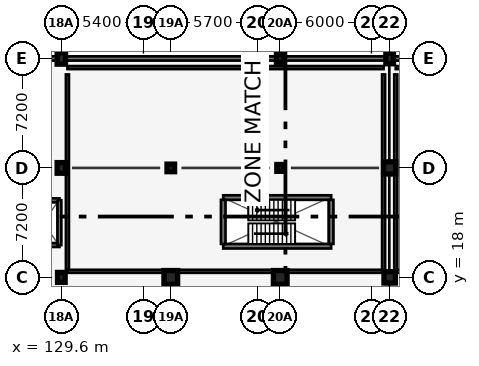
"""IFC4 building model, lengths in metres.
Left out: names, types, materials, properties, quantities, classifications, styles, units other than length and angle.
Written with IfcOpenShell. Run it as: python <this file> out.ifc"""

import sys

from ifc_helpers import new_model, si_unit, direction, frame, frame_2d, origin, origin_2d, place, context, subcontext, project, spatial, rectangle, circle, extrude, element, fill, save


model = new_model("IFC4")
c1 = context("Model", 3, precision=1e-05, world=origin(), true_north=direction((0.0, 1.0)))
c2 = subcontext(c1, "Body", "Model", "MODEL_VIEW")
j1 = project(units=[si_unit("LENGTHUNIT", "METRE"), si_unit("PLANEANGLEUNIT", "RADIAN")], contexts=[c1])
p1 = place(None, origin())
s1 = spatial("IfcSite", under=j1, at=p1, CompositionType="ELEMENT")
p2 = place(p1, origin())
s2 = spatial("IfcBuilding", under=s1, at=p2, CompositionType="ELEMENT")
p3 = place(p2, frame((0.0, 0.0, 9.0)))
s3 = spatial("IfcBuildingStorey", under=s2, at=p3, CompositionType="ELEMENT", Elevation=9.0)
p4 = place(p3, frame((129.6, 18.0, 0.0), z_axis=(0.0, 0.0, 1.0), x_axis=(1.0, 0.0, 0.0)))
e1 = element("IfcColumn", 1, at=p4, inside=s3, PredefinedType="COLUMN", context=c2, shape_type="SweptSolid", body=[
    extrude(rectangle(XDim=0.5, YDim=0.65, at=origin_2d()), origin(), (0.0, 0.0, 1.0), 4.2),
])
p5 = place(p3, frame((129.6, 25.2, 0.0), z_axis=(0.0, 0.0, 1.0), x_axis=(1.0, 0.0, 0.0)))
e2 = element("IfcColumn", 2, at=p5, inside=s3, PredefinedType="COLUMN", context=c2, shape_type="SweptSolid", body=[
    extrude(rectangle(XDim=0.55, YDim=0.7, at=origin_2d()), origin(), (0.0, 0.0, 1.0), 4.2),
])
p6 = place(p3, frame((129.6, 32.4, 0.0), z_axis=(0.0, 0.0, 1.0), x_axis=(1.0, 0.0, 0.0)))
e3 = element("IfcColumn", 3, at=p6, inside=s3, PredefinedType="COLUMN", context=c2, shape_type="SweptSolid", body=[
    extrude(rectangle(XDim=0.55, YDim=0.75, at=origin_2d()), origin(), (0.0, 0.0, 1.0), 4.2),
])
p7 = place(p3, frame((136.8, 18.0, 0.0), z_axis=(0.0, 0.0, 1.0), x_axis=(1.0, 0.0, 0.0)))
e4 = element("IfcColumn", 4, at=p7, inside=s3, PredefinedType="COLUMN", context=c2, shape_type="SweptSolid", body=[
    extrude(rectangle(XDim=0.9, YDim=0.9, at=origin_2d()), origin(), (0.0, 0.0, 1.0), 4.2),
])
p8 = place(p3, frame((136.8, 25.2, 0.0), z_axis=(0.0, 0.0, 1.0), x_axis=(1.0, 0.0, 0.0)))
e5 = element("IfcColumn", 5, at=p8, inside=s3, PredefinedType="COLUMN", context=c2, shape_type="SweptSolid", body=[
    extrude(circle(Radius=0.25, at=origin_2d()), origin(), (0.0, 0.0, 1.0), 4.2),
])
p9 = place(p3, frame((144.0, 18.0, 0.0), z_axis=(0.0, 0.0, 1.0), x_axis=(1.0, 0.0, 0.0)))
e6 = element("IfcColumn", 6, at=p9, inside=s3, PredefinedType="COLUMN", context=c2, shape_type="SweptSolid", body=[
    extrude(circle(Radius=0.45, at=origin_2d()), origin(), (0.0, 0.0, 1.0), 4.2),
])
p10 = place(p3, frame((144.0, 25.2, 0.0), z_axis=(0.0, 0.0, 1.0), x_axis=(1.0, 0.0, 0.0)))
e7 = element("IfcColumn", 7, at=p10, inside=s3, PredefinedType="COLUMN", context=c2, shape_type="SweptSolid", body=[
    extrude(rectangle(XDim=0.45, YDim=0.45, at=origin_2d()), origin(), (0.0, 0.0, 1.0), 4.2),
])
p11 = place(p3, frame((144.0, 32.4, 0.0), z_axis=(0.0, 0.0, 1.0), x_axis=(1.0, 0.0, 0.0)))
e8 = element("IfcColumn", 8, at=p11, inside=s3, PredefinedType="COLUMN", context=c2, shape_type="SweptSolid", body=[
    extrude(rectangle(XDim=0.5, YDim=0.5, at=origin_2d()), origin(), (0.0, 0.0, 1.0), 4.2),
])
p12 = place(p3, frame((151.2, 18.0, 0.0), z_axis=(0.0, 0.0, 1.0), x_axis=(1.0, 0.0, 0.0)))
e9 = element("IfcColumn", 9, at=p12, inside=s3, PredefinedType="COLUMN", context=c2, shape_type="SweptSolid", body=[
    extrude(rectangle(XDim=0.75, YDim=0.75, at=origin_2d()), origin(), (0.0, 0.0, 1.0), 4.2),
])
p13 = place(p3, frame((151.2, 25.2, 0.0), z_axis=(0.0, 0.0, 1.0), x_axis=(1.0, 0.0, 0.0)))
e10 = element("IfcColumn", 10, at=p13, inside=s3, PredefinedType="COLUMN", context=c2, shape_type="SweptSolid", body=[
    extrude(rectangle(XDim=0.8, YDim=0.8, at=origin_2d()), origin(), (0.0, 0.0, 1.0), 4.2),
])
p14 = place(p3, frame((151.2, 32.4, 0.0), z_axis=(0.0, 0.0, 1.0), x_axis=(1.0, 0.0, 0.0)))
e11 = element("IfcColumn", 11, at=p14, inside=s3, PredefinedType="COLUMN", context=c2, shape_type="SweptSolid", body=[
    extrude(rectangle(XDim=0.5, YDim=0.7, at=origin_2d()), origin(), (0.0, 0.0, 1.0), 4.2),
])
p15 = place(p3, frame((165.6, 32.4, 0.0), z_axis=(0.0, 0.0, 1.0), x_axis=(-1.0, 0.0, 0.0)))
e12 = element("IfcWall", 12, at=p15, inside=s3, PredefinedType="SOLIDWALL", context=c2, shape_type="SweptSolid", body=[
    extrude(rectangle(XDim=43.2, YDim=0.28, at=frame_2d((21.6, 0.0))), origin(), (0.0, 0.0, 1.0), 3.4),
])
p16 = place(p15, frame((2.2, 0.0, 0.78)))
e13 = element("IfcOpeningElement", 13, at=p16, cuts=e12, PredefinedType="OPENING", context=c2, shape_type="SweptSolid", body=[
    extrude(rectangle(XDim=2.1, YDim=1.8, at=frame_2d((1.05, 0.9))), frame((0.0, 0.15, 0.0), z_axis=(0.0, -1.0, 0.0), x_axis=(1.0, 0.0, 0.0)), (0.0, 0.0, 1.0), 0.3),
])
p17 = place(p15, frame((9.4, 0.0, 0.78)))
e14 = element("IfcOpeningElement", 14, at=p17, cuts=e12, PredefinedType="OPENING", context=c2, shape_type="SweptSolid", body=[
    extrude(rectangle(XDim=1.1, YDim=1.65, at=frame_2d((0.55, 0.825))), frame((0.0, 0.15, 0.0), z_axis=(0.0, -1.0, 0.0), x_axis=(1.0, 0.0, 0.0)), (0.0, 0.0, 1.0), 0.3),
])
p18 = place(p15, frame((16.6, 0.0, 0.78)))
e15 = element("IfcOpeningElement", 15, at=p18, cuts=e12, PredefinedType="OPENING", context=c2, shape_type="SweptSolid", body=[
    extrude(rectangle(XDim=1.25, YDim=1.7, at=frame_2d((0.625, 0.85))), frame((0.0, 0.15, 0.0), z_axis=(0.0, -1.0, 0.0), x_axis=(1.0, 0.0, 0.0)), (0.0, 0.0, 1.0), 0.3),
])
p19 = place(p15, frame((23.8, 0.0, 0.78)))
e16 = element("IfcOpeningElement", 16, at=p19, cuts=e12, PredefinedType="OPENING", context=c2, shape_type="SweptSolid", body=[
    extrude(rectangle(XDim=1.35, YDim=1.75, at=frame_2d((0.675, 0.875))), frame((0.0, 0.15, 0.0), z_axis=(0.0, -1.0, 0.0), x_axis=(1.0, 0.0, 0.0)), (0.0, 0.0, 1.0), 0.3),
])
p20 = place(p15, frame((31.0, 0.0, 0.78)))
e17 = element("IfcOpeningElement", 17, at=p20, cuts=e12, PredefinedType="OPENING", context=c2, shape_type="SweptSolid", body=[
    extrude(rectangle(XDim=1.5, YDim=1.75, at=frame_2d((0.75, 0.875))), frame((0.0, 0.15, 0.0), z_axis=(0.0, -1.0, 0.0), x_axis=(1.0, 0.0, 0.0)), (0.0, 0.0, 1.0), 0.3),
])
p21 = place(p3, frame((140.25, 20.05, 0.0), z_axis=(0.0, 0.0, 1.0), x_axis=(1.0, 0.0, 0.0)))
e18 = element("IfcWall", 18, at=p21, inside=s3, PredefinedType="SHEAR", context=c2, shape_type="SweptSolid", body=[
    extrude(rectangle(XDim=7.1, YDim=0.3, at=frame_2d((3.55, 0.0))), origin(), (0.0, 0.0, 1.0), 3.875),
])
p22 = place(p21, frame((0.35, 0.0, 0.0)))
e19 = element("IfcOpeningElement", 19, at=p22, cuts=e18, PredefinedType="OPENING", context=c2, shape_type="SweptSolid", body=[
    extrude(rectangle(XDim=1.05, YDim=2.15, at=frame_2d((0.525, 1.075))), frame((0.0, 0.16, 0.0), z_axis=(0.0, -1.0, 0.0), x_axis=(1.0, 0.0, 0.0)), (0.0, 0.0, 1.0), 0.32),
])
p23 = place(p3, frame((147.35, 23.25, 0.0), z_axis=(0.0, 0.0, 1.0), x_axis=(-1.0, 0.0, 0.0)))
e20 = element("IfcWall", 20, at=p23, inside=s3, PredefinedType="SHEAR", context=c2, shape_type="SweptSolid", body=[
    extrude(rectangle(XDim=7.1, YDim=0.3, at=frame_2d((3.55, 0.0))), origin(), (0.0, 0.0, 1.0), 3.875),
])
for number, where, z_axis, x_axis in (
    (21, (147.35, 20.2, 0.0), (0.0, 0.0, 1.0), (0.0, 1.0, 0.0)),
    (22, (140.25, 23.1, 0.0), (0.0, 0.0, 1.0), (0.0, -1.0, 0.0)),
):
    element("IfcWall", number, at=place(p3, frame(where, z_axis=z_axis, x_axis=x_axis)), inside=s3, PredefinedType="SHEAR", context=c2, shape_type="SweptSolid", body=[
        extrude(rectangle(XDim=2.9, YDim=0.3, at=frame_2d((1.45, 0.0))), origin(), (0.0, 0.0, 1.0), 3.875),
    ])
p24 = place(p3, frame((127.325, 20.125, 0.0), z_axis=(0.0, 0.0, 1.0), x_axis=(1.0, 0.0, 0.0)))
e23 = element("IfcWall", 23, at=p24, inside=s3, PredefinedType="SHEAR", context=c2, shape_type="SweptSolid", body=[
    extrude(rectangle(XDim=2.15, YDim=0.25, at=frame_2d((1.075, 0.0))), origin(), (0.0, 0.0, 1.0), 3.9),
])
p25 = place(p3, frame((129.475, 23.075, 0.0), z_axis=(0.0, 0.0, 1.0), x_axis=(-1.0, 0.0, 0.0)))
e24 = element("IfcWall", 24, at=p25, inside=s3, PredefinedType="SHEAR", context=c2, shape_type="SweptSolid", body=[
    extrude(rectangle(XDim=2.15, YDim=0.25, at=frame_2d((1.075, 0.0))), origin(), (0.0, 0.0, 1.0), 3.9),
])
p26 = place(p25, frame((0.525, 0.0, 0.0)))
e25 = element("IfcOpeningElement", 25, at=p26, cuts=e24, PredefinedType="OPENING", context=c2, shape_type="SweptSolid", body=[
    extrude(rectangle(XDim=1.1, YDim=2.15, at=frame_2d((0.55, 1.075))), frame((0.0, 0.135, 0.0), z_axis=(0.0, -1.0, 0.0), x_axis=(1.0, 0.0, 0.0)), (0.0, 0.0, 1.0), 0.27),
])
p27 = place(p3, frame((129.475, 20.125, 0.0), z_axis=(0.0, 0.0, 1.0), x_axis=(0.0, 1.0, 0.0)))
e26 = element("IfcWall", 26, at=p27, inside=s3, PredefinedType="SHEAR", context=c2, shape_type="SweptSolid", body=[
    extrude(rectangle(XDim=2.95, YDim=0.25, at=frame_2d((1.475, 0.0))), origin(), (0.0, 0.0, 1.0), 3.9),
])
p28 = place(p3, frame((130.0, 31.8, 0.0), z_axis=(0.0, 0.0, 1.0), x_axis=(1.0, 0.0, 0.0)))
e27 = element("IfcWall", 27, at=p28, inside=s3, PredefinedType="SOLIDWALL", context=c2, shape_type="SweptSolid", body=[
    extrude(rectangle(XDim=20.8, YDim=0.2, at=frame_2d((10.4, 0.0))), origin(), (0.0, 0.0, 1.0), 3.502),
])
p29 = place(p3, frame((150.8, 18.4, 0.0), z_axis=(0.0, 0.0, 1.0), x_axis=(0.0, 1.0, 0.0)))
e28 = element("IfcWall", 28, at=p29, inside=s3, PredefinedType="SOLIDWALL", context=c2, shape_type="SweptSolid", body=[
    extrude(rectangle(XDim=12.95, YDim=0.2, at=frame_2d((6.475, 0.0))), origin(), (0.0, 0.0, 1.0), 3.207),
])
p30 = place(p3, frame((130.0, 31.35, 0.0), z_axis=(0.0, 0.0, 1.0), x_axis=(0.0, -1.0, 0.0)))
e29 = element("IfcWall", 29, at=p30, inside=s3, PredefinedType="SOLIDWALL", context=c2, shape_type="SweptSolid", body=[
    extrude(rectangle(XDim=12.95, YDim=0.2, at=frame_2d((6.475, 0.0))), origin(), (0.0, 0.0, 1.0), 3.257),
])
p31 = place(p3, frame((150.8, 18.4, 0.0), z_axis=(0.0, 0.0, 1.0), x_axis=(-1.0, 0.0, 0.0)))
e30 = element("IfcWall", 30, at=p31, inside=s3, PredefinedType="SOLIDWALL", context=c2, shape_type="SweptSolid", body=[
    extrude(rectangle(XDim=20.8, YDim=0.2, at=frame_2d((10.4, 0.0))), origin(), (0.0, 0.0, 1.0), 3.107),
])
p32 = place(p31, frame((9.5, 0.0, 0.0)))
e31 = element("IfcOpeningElement", 31, at=p32, cuts=e30, PredefinedType="OPENING", context=c2, shape_type="SweptSolid", body=[
    extrude(rectangle(XDim=1.8, YDim=2.2, at=frame_2d((0.9, 1.1))), frame((0.0, 0.11, 0.0), z_axis=(0.0, -1.0, 0.0), x_axis=(1.0, 0.0, 0.0)), (0.0, 0.0, 1.0), 0.22),
])
p33 = place(p3, frame((151.6, 31.8, 0.0), z_axis=(0.0, 0.0, 1.0), x_axis=(1.0, 0.0, 0.0)))
e32 = element("IfcWall", 32, at=p33, inside=s3, PredefinedType="SOLIDWALL", context=c2, shape_type="SweptSolid", body=[
    extrude(rectangle(XDim=13.8, YDim=0.2, at=frame_2d((6.9, 0.0))), origin(), (0.0, 0.0, 1.0), 3.007),
])
p34 = place(p3, frame((151.6, 31.35, 0.0), z_axis=(0.0, 0.0, 1.0), x_axis=(0.0, -1.0, 0.0)))
e33 = element("IfcWall", 33, at=p34, inside=s3, PredefinedType="SOLIDWALL", context=c2, shape_type="SweptSolid", body=[
    extrude(rectangle(XDim=12.95, YDim=0.2, at=frame_2d((6.475, 0.0))), origin(), (0.0, 0.0, 1.0), 3.257),
])
p35 = place(p3, frame((165.4, 18.4, 0.0), z_axis=(0.0, 0.0, 1.0), x_axis=(-1.0, 0.0, 0.0)))
e34 = element("IfcWall", 34, at=p35, inside=s3, PredefinedType="SOLIDWALL", context=c2, shape_type="SweptSolid", body=[
    extrude(rectangle(XDim=13.8, YDim=0.2, at=frame_2d((6.9, 0.0))), origin(), (0.0, 0.0, 1.0), 3.057),
])
p36 = place(p35, frame((3.6, 0.0, 0.0)))
e35 = element("IfcOpeningElement", 35, at=p36, cuts=e34, PredefinedType="OPENING", context=c2, shape_type="SweptSolid", body=[
    extrude(rectangle(XDim=1.8, YDim=2.2, at=frame_2d((0.9, 1.1))), frame((0.0, 0.11, 0.0), z_axis=(0.0, -1.0, 0.0), x_axis=(1.0, 0.0, 0.0)), (0.0, 0.0, 1.0), 0.22),
])
p37 = place(p18, origin())
e36 = element("IfcWindow", 36, at=p37, inside=s3, PartitioningType="SINGLE_PANEL", PredefinedType="WINDOW", context=c2, shape_type="SweptSolid", body=[
    extrude(rectangle(XDim=1.25, YDim=1.7, at=frame_2d((0.625, 0.85))), frame((0.0, 0.03, 0.0), z_axis=(0.0, -1.0, 0.0), x_axis=(1.0, 0.0, 0.0)), (0.0, 0.0, 1.0), 0.06),
])
fill(e15, e36)
p38 = place(p19, origin())
e37 = element("IfcWindow", 37, at=p38, inside=s3, PartitioningType="SINGLE_PANEL", PredefinedType="WINDOW", context=c2, shape_type="SweptSolid", body=[
    extrude(rectangle(XDim=1.35, YDim=1.75, at=frame_2d((0.675, 0.875))), frame((0.0, 0.03, 0.0), z_axis=(0.0, -1.0, 0.0), x_axis=(1.0, 0.0, 0.0)), (0.0, 0.0, 1.0), 0.06),
])
fill(e16, e37)
p39 = place(p20, origin())
e38 = element("IfcWindow", 38, at=p39, inside=s3, PartitioningType="SINGLE_PANEL", PredefinedType="WINDOW", context=c2, shape_type="SweptSolid", body=[
    extrude(rectangle(XDim=1.5, YDim=1.75, at=frame_2d((0.75, 0.875))), frame((0.0, 0.03, 0.0), z_axis=(0.0, -1.0, 0.0), x_axis=(1.0, 0.0, 0.0)), (0.0, 0.0, 1.0), 0.06),
])
fill(e17, e38)
p40 = place(p22, origin())
e39 = element("IfcDoor", 39, at=p40, inside=s3, OperationType="SINGLE_SWING_LEFT", PredefinedType="DOOR", context=c2, shape_type="SweptSolid", body=[
    extrude(rectangle(XDim=1.05, YDim=2.15, at=frame_2d((0.525, 1.075))), frame((0.0, 0.025, 0.0), z_axis=(0.0, -1.0, 0.0), x_axis=(1.0, 0.0, 0.0)), (0.0, 0.0, 1.0), 0.05),
])
fill(e19, e39)
p41 = place(p32, origin())
e40 = element("IfcDoor", 40, at=p41, inside=s3, OperationType="DOUBLE_SWING_LEFT", PredefinedType="DOOR", context=c2, shape_type="SweptSolid", body=[
    extrude(rectangle(XDim=1.8, YDim=2.2, at=frame_2d((0.9, 1.1))), frame((0.0, 0.025, 0.0), z_axis=(0.0, -1.0, 0.0), x_axis=(1.0, 0.0, 0.0)), (0.0, 0.0, 1.0), 0.05),
])
fill(e31, e40)
save(model, sys.argv[1])
